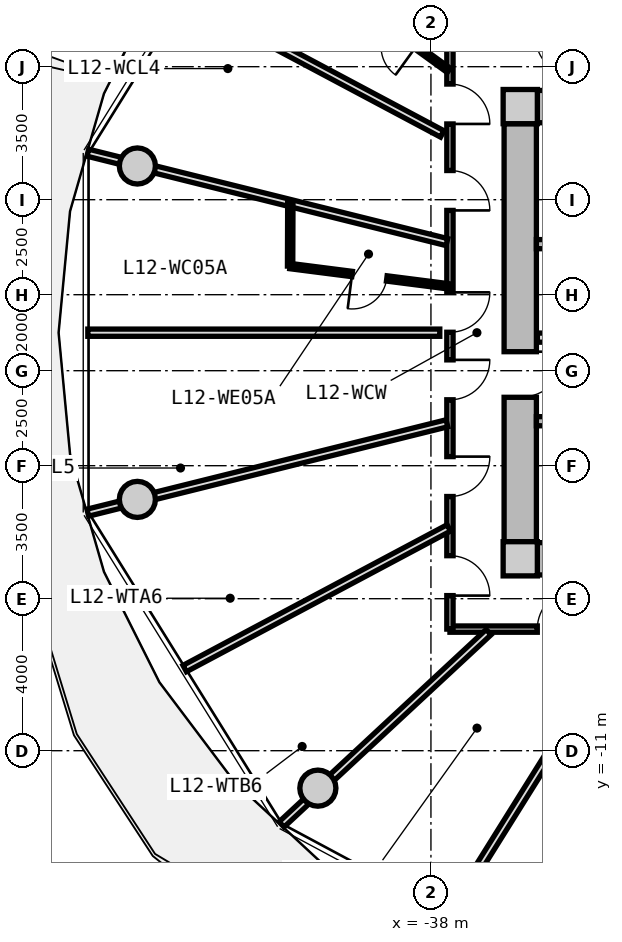
"""IFC4 building model, lengths in metres.
Left out: names, types, materials, properties, quantities, classifications, styles, units other than length and angle.
Written with IfcOpenShell. Run it as: python <this file> out.ifc"""

import sys

from ifc_helpers import new_model, si_unit, direction, frame, frame_2d, origin, origin_2d, place, context, subcontext, project, spatial, rectangle, circle, extrude, source, transform, mapped, element, fill, save


model = new_model("IFC4")
c1 = context("Model", 3, precision=1e-05, world=origin(), true_north=direction((0.0, 1.0)))
c2 = subcontext(c1, "Body", "Model", "MODEL_VIEW")
j1 = project(units=[si_unit("LENGTHUNIT", "METRE"), si_unit("PLANEANGLEUNIT", "RADIAN")], contexts=[c1])
p1 = place(None, origin())
s1 = spatial("IfcSite", under=j1, at=p1, CompositionType="ELEMENT")
p2 = place(p1, origin())
s2 = spatial("IfcBuilding", under=s1, at=p2, CompositionType="ELEMENT")
p3 = place(p2, frame((0.0, 0.0, 42.95)))
s3 = spatial("IfcBuildingStorey", under=s2, at=p3, CompositionType="ELEMENT", Elevation=42.95)
m1 = source(origin(), c2, "Body", "SweptSolid", [
    extrude(rectangle(XDim=0.9, YDim=0.9, at=origin_2d()), origin(), (0.0, 0.0, 1.0), 3.05),
])
for number, where, z_axis, x_axis in (
    (1, (-35.65, -5.95, 0.0), (0.0, 0.0, 1.0), (1.0, 0.0, 0.0)),
    (2, (-35.65, 5.95, 0.0), (0.0, 0.0, 1.0), (1.0, 0.0, 0.0)),
):
    element("IfcColumn", number, at=place(p3, frame(where, z_axis=z_axis, x_axis=x_axis)), inside=s3, PredefinedType="COLUMN", context=c2, shape_type="MappedRepresentation", body=[
        mapped(m1, transform((0.0, 0.0, 0.0), x_axis=(1.0, 0.0, 0.0), y_axis=(0.0, 1.0, 0.0), z_axis=(0.0, 0.0, 1.0), scale=1.0)),
    ])
m2 = source(origin(), c2, "Body", "SweptSolid", [
    extrude(rectangle(XDim=14.4, YDim=0.85, at=frame_2d((7.2, 0.0))), origin(), (0.0, 0.0, 1.0), 2.79),
])
for number, where, z_axis, x_axis in (
    (3, (-35.2, 5.95, 0.0), (0.0, 0.0, 1.0), (1.0, 0.0, 0.0)),
    (4, (-20.8, -5.95, 0.0), (0.0, 0.0, 1.0), (-1.0, 0.0, 0.0)),
):
    element("IfcWall", number, at=place(p3, frame(where, z_axis=z_axis, x_axis=x_axis)), inside=s3, PredefinedType="SHEAR", context=c2, shape_type="MappedRepresentation", body=[
        mapped(m2, transform((0.0, 0.0, 0.0), x_axis=(1.0, 0.0, 0.0), y_axis=(0.0, 1.0, 0.0), z_axis=(0.0, 0.0, 1.0), scale=1.0)),
    ])
m3 = source(origin(), c2, "Body", "SweptSolid", [
    extrude(rectangle(XDim=11.0, YDim=0.85, at=frame_2d((5.5, 0.0))), origin(), (0.0, 0.0, 1.0), 2.79),
])
p4 = place(p3, frame((-35.65, -5.5, 0.0), z_axis=(0.0, 0.0, 1.0), x_axis=(0.0, 1.0, 0.0)))
e5 = element("IfcWall", 5, at=p4, inside=s3, PredefinedType="SHEAR", context=c2, shape_type="MappedRepresentation", body=[
    mapped(m3, transform((0.0, 0.0, 0.0), x_axis=(1.0, 0.0, 0.0), y_axis=(0.0, 1.0, 0.0), z_axis=(0.0, 0.0, 1.0), scale=1.0)),
])
p5 = place(p4, frame((3.8, 0.0, 0.0)))
e6 = element("IfcOpeningElement", 6, at=p5, cuts=e5, PredefinedType="OPENING", context=c2, shape_type="SweptSolid", body=[
    extrude(rectangle(XDim=1.2, YDim=2.15, at=frame_2d((0.6, 1.075))), frame((0.0, 0.435, 0.0), z_axis=(0.0, -1.0, 0.0), x_axis=(1.0, 0.0, 0.0)), (0.0, 0.0, 1.0), 0.87),
])
m4 = source(origin(), c2, "Body", "SweptSolid", [
    extrude(circle(Radius=0.475, at=origin_2d()), origin(), (0.0, 0.0, 1.0), 3.05),
])
for number, where, z_axis, x_axis in (
    (7, (-45.725, 4.387, 0.0), (0.0, 0.0, 1.0), (1.0, 0.0, 0.0)),
    (8, (-45.725, -4.387, 0.0), (0.0, 0.0, 1.0), (1.0, 0.0, 0.0)),
    (9, (-40.975, -11.985, 0.0), (0.0, 0.0, 1.0), (1.0, 0.0, 0.0)),
):
    element("IfcColumn", number, at=place(p3, frame(where, z_axis=z_axis, x_axis=x_axis)), inside=s3, PredefinedType="COLUMN", context=c2, shape_type="MappedRepresentation", body=[
        mapped(m4, transform((0.0, 0.0, 0.0), x_axis=(1.0, 0.0, 0.0), y_axis=(0.0, 1.0, 0.0), z_axis=(0.0, 0.0, 1.0), scale=1.0)),
    ])
m5 = source(origin(), c2, "Body", "SweptSolid", [
    extrude(rectangle(XDim=7.765, YDim=0.24, at=frame_2d((3.883, 0.0))), origin(), (0.0, 0.0, 1.0), 2.79),
])
p6 = place(p3, frame((-35.225, 2.33, 0.0), z_axis=(0.0, 0.0, 1.0), x_axis=(1.0, 0.0, 0.0)))
e10 = element("IfcWall", 10, at=p6, inside=s3, PredefinedType="PARTITIONING", context=c2, shape_type="MappedRepresentation", body=[
    mapped(m5, transform((0.0, 0.0, 0.0), x_axis=(1.0, 0.0, 0.0), y_axis=(0.0, 1.0, 0.0), z_axis=(0.0, 0.0, 1.0), scale=1.0)),
])
p7 = place(p3, frame((-35.225, -2.33, 0.0), z_axis=(0.0, 0.0, 1.0), x_axis=(1.0, 0.0, 0.0)))
e11 = element("IfcWall", 11, at=p7, inside=s3, PredefinedType="PARTITIONING", context=c2, shape_type="MappedRepresentation", body=[
    mapped(m5, transform((0.0, 0.0, 0.0), x_axis=(1.0, 0.0, 0.0), y_axis=(0.0, 1.0, 0.0), z_axis=(0.0, 0.0, 1.0), scale=1.0)),
])
p8 = place(p7, frame((0.885, 0.0, 0.0)))
e12 = element("IfcOpeningElement", 12, at=p8, cuts=e11, PredefinedType="OPENING", context=c2, shape_type="SweptSolid", body=[
    extrude(rectangle(XDim=1.1, YDim=2.15, at=frame_2d((0.55, 1.075))), frame((0.0, 0.13, 0.0), z_axis=(0.0, -1.0, 0.0), x_axis=(1.0, 0.0, 0.0)), (0.0, 0.0, 1.0), 0.26),
])
m6 = source(origin(), c2, "Body", "SweptSolid", [
    extrude(rectangle(XDim=7.62, YDim=0.24, at=frame_2d((3.81, 0.0))), origin(), (0.0, 0.0, 1.0), 2.775),
])
p9 = place(p3, frame((-35.2, -0.13, 0.0), z_axis=(0.0, 0.0, 1.0), x_axis=(1.0, 0.0, 0.0)))
e13 = element("IfcWall", 13, at=p9, inside=s3, PredefinedType="PARTITIONING", context=c2, shape_type="MappedRepresentation", body=[
    mapped(m6, transform((0.0, 0.0, 0.0), x_axis=(1.0, 0.0, 0.0), y_axis=(0.0, 1.0, 0.0), z_axis=(0.0, 0.0, 1.0), scale=1.0)),
])
p10 = place(p9, frame((6.22, 0.0, 0.0)))
e14 = element("IfcOpeningElement", 14, at=p10, cuts=e13, PredefinedType="OPENING", context=c2, shape_type="SweptSolid", body=[
    extrude(rectangle(XDim=1.0, YDim=2.1, at=frame_2d((0.5, 1.05))), frame((0.0, 0.13, 0.0), z_axis=(0.0, -1.0, 0.0), x_axis=(1.0, 0.0, 0.0)), (0.0, 0.0, 1.0), 0.26),
])
p11 = place(p9, frame((0.85, 0.0, 0.0)))
e15 = element("IfcOpeningElement", 15, at=p11, cuts=e13, PredefinedType="OPENING", context=c2, shape_type="SweptSolid", body=[
    extrude(rectangle(XDim=1.1, YDim=2.2, at=frame_2d((0.55, 1.1))), frame((0.0, 0.13, 0.0), z_axis=(0.0, -1.0, 0.0), x_axis=(1.0, 0.0, 0.0)), (0.0, 0.0, 1.0), 0.26),
])
p12 = place(p9, frame((3.85, 0.0, 0.0)))
e16 = element("IfcOpeningElement", 16, at=p12, cuts=e13, PredefinedType="OPENING", context=c2, shape_type="SweptSolid", body=[
    extrude(rectangle(XDim=1.1, YDim=2.2, at=frame_2d((0.55, 1.1))), frame((0.0, 0.13, 0.0), z_axis=(0.0, -1.0, 0.0), x_axis=(1.0, 0.0, 0.0)), (0.0, 0.0, 1.0), 0.26),
])
m7 = source(origin(), c2, "Body", "SweptSolid", [
    extrude(rectangle(XDim=19.0, YDim=0.165, at=frame_2d((9.5, 0.0))), origin(), (0.0, 0.0, 1.0), 2.775),
])
p13 = place(p3, frame((-18.5, -7.8, 0.0), z_axis=(0.0, 0.0, 1.0), x_axis=(-1.0, 0.0, 0.0)))
e17 = element("IfcWall", 17, at=p13, inside=s3, PredefinedType="PARTITIONING", context=c2, shape_type="MappedRepresentation", body=[
    mapped(m7, transform((0.0, 0.0, 0.0), x_axis=(1.0, 0.0, 0.0), y_axis=(0.0, 1.0, 0.0), z_axis=(0.0, 0.0, 1.0), scale=1.0)),
])
p14 = place(p13, frame((15.652, 0.0, 0.0)))
e18 = element("IfcOpeningElement", 18, at=p14, cuts=e17, PredefinedType="OPENING", context=c2, shape_type="SweptSolid", body=[
    extrude(rectangle(XDim=1.05, YDim=2.15, at=frame_2d((0.525, 1.075))), frame((0.0, 0.093, 0.0), z_axis=(0.0, -1.0, 0.0), x_axis=(1.0, 0.0, 0.0)), (0.0, 0.0, 1.0), 0.185),
])
p15 = place(p13, frame((12.5, 0.0, 0.0)))
e19 = element("IfcOpeningElement", 19, at=p15, cuts=e17, PredefinedType="OPENING", context=c2, shape_type="SweptSolid", body=[
    extrude(rectangle(XDim=1.05, YDim=2.15, at=frame_2d((0.525, 1.075))), frame((0.0, 0.093, 0.0), z_axis=(0.0, -1.0, 0.0), x_axis=(1.0, 0.0, 0.0)), (0.0, 0.0, 1.0), 0.185),
])
p16 = place(p13, frame((10.104, 0.0, 0.0)))
e20 = element("IfcOpeningElement", 20, at=p16, cuts=e17, PredefinedType="OPENING", context=c2, shape_type="SweptSolid", body=[
    extrude(rectangle(XDim=1.05, YDim=2.15, at=frame_2d((0.525, 1.075))), frame((0.0, 0.093, 0.0), z_axis=(0.0, -1.0, 0.0), x_axis=(1.0, 0.0, 0.0)), (0.0, 0.0, 1.0), 0.185),
])
p17 = place(p13, frame((7.806, 0.0, 0.0)))
e21 = element("IfcOpeningElement", 21, at=p17, cuts=e17, PredefinedType="OPENING", context=c2, shape_type="SweptSolid", body=[
    extrude(rectangle(XDim=1.05, YDim=2.15, at=frame_2d((0.525, 1.075))), frame((0.0, 0.093, 0.0), z_axis=(0.0, -1.0, 0.0), x_axis=(1.0, 0.0, 0.0)), (0.0, 0.0, 1.0), 0.185),
])
p18 = place(p13, frame((5.915, 0.0, 0.0)))
e22 = element("IfcOpeningElement", 22, at=p18, cuts=e17, PredefinedType="OPENING", context=c2, shape_type="SweptSolid", body=[
    extrude(rectangle(XDim=0.92, YDim=2.1, at=frame_2d((0.46, 1.05))), frame((0.0, 0.093, 0.0), z_axis=(0.0, -1.0, 0.0), x_axis=(1.0, 0.0, 0.0)), (0.0, 0.0, 1.0), 0.185),
])
p19 = place(p13, frame((2.769, 0.0, 0.0)))
e23 = element("IfcOpeningElement", 23, at=p19, cuts=e17, PredefinedType="OPENING", context=c2, shape_type="SweptSolid", body=[
    extrude(rectangle(XDim=0.92, YDim=2.1, at=frame_2d((0.46, 1.05))), frame((0.0, 0.093, 0.0), z_axis=(0.0, -1.0, 0.0), x_axis=(1.0, 0.0, 0.0)), (0.0, 0.0, 1.0), 0.185),
])
m8 = source(origin(), c2, "Body", "SweptSolid", [
    extrude(rectangle(XDim=15.6, YDim=0.165, at=frame_2d((7.8, 0.0))), origin(), (0.0, 0.0, 1.0), 2.775),
])
p20 = place(p3, frame((-37.5, -7.8, 0.0), z_axis=(0.0, 0.0, 1.0), x_axis=(0.0, 1.0, 0.0)))
e24 = element("IfcWall", 24, at=p20, inside=s3, PredefinedType="PARTITIONING", context=c2, shape_type="MappedRepresentation", body=[
    mapped(m8, transform((0.0, 0.0, 0.0), x_axis=(1.0, 0.0, 0.0), y_axis=(0.0, 1.0, 0.0), z_axis=(0.0, 0.0, 1.0), scale=1.0)),
])
p21 = place(p20, frame((13.293, 0.0, 0.0)))
e25 = element("IfcOpeningElement", 25, at=p21, cuts=e24, PredefinedType="OPENING", context=c2, shape_type="SweptSolid", body=[
    extrude(rectangle(XDim=1.05, YDim=2.15, at=frame_2d((0.525, 1.075))), frame((0.0, 0.093, 0.0), z_axis=(0.0, -1.0, 0.0), x_axis=(1.0, 0.0, 0.0)), (0.0, 0.0, 1.0), 0.185),
])
p22 = place(p20, frame((11.018, 0.0, 0.0)))
e26 = element("IfcOpeningElement", 26, at=p22, cuts=e24, PredefinedType="OPENING", context=c2, shape_type="SweptSolid", body=[
    extrude(rectangle(XDim=1.05, YDim=2.15, at=frame_2d((0.525, 1.075))), frame((0.0, 0.093, 0.0), z_axis=(0.0, -1.0, 0.0), x_axis=(1.0, 0.0, 0.0)), (0.0, 0.0, 1.0), 0.185),
])
p23 = place(p20, frame((7.812, 0.0, 0.0)))
e27 = element("IfcOpeningElement", 27, at=p23, cuts=e24, PredefinedType="OPENING", context=c2, shape_type="SweptSolid", body=[
    extrude(rectangle(XDim=1.05, YDim=2.15, at=frame_2d((0.525, 1.075))), frame((0.0, 0.093, 0.0), z_axis=(0.0, -1.0, 0.0), x_axis=(1.0, 0.0, 0.0)), (0.0, 0.0, 1.0), 0.185),
])
p24 = place(p20, frame((6.035, 0.0, 0.0)))
e28 = element("IfcOpeningElement", 28, at=p24, cuts=e24, PredefinedType="OPENING", context=c2, shape_type="SweptSolid", body=[
    extrude(rectangle(XDim=1.05, YDim=2.15, at=frame_2d((0.525, 1.075))), frame((0.0, 0.093, 0.0), z_axis=(0.0, -1.0, 0.0), x_axis=(1.0, 0.0, 0.0)), (0.0, 0.0, 1.0), 0.185),
])
p25 = place(p20, frame((3.489, 0.0, 0.0)))
e29 = element("IfcOpeningElement", 29, at=p25, cuts=e24, PredefinedType="OPENING", context=c2, shape_type="SweptSolid", body=[
    extrude(rectangle(XDim=1.05, YDim=2.15, at=frame_2d((0.525, 1.075))), frame((0.0, 0.093, 0.0), z_axis=(0.0, -1.0, 0.0), x_axis=(1.0, 0.0, 0.0)), (0.0, 0.0, 1.0), 0.185),
])
p26 = place(p20, frame((0.882, 0.0, 0.0)))
e30 = element("IfcOpeningElement", 30, at=p26, cuts=e24, PredefinedType="OPENING", context=c2, shape_type="SweptSolid", body=[
    extrude(rectangle(XDim=1.05, YDim=2.15, at=frame_2d((0.525, 1.075))), frame((0.0, 0.093, 0.0), z_axis=(0.0, -1.0, 0.0), x_axis=(1.0, 0.0, 0.0)), (0.0, 0.0, 1.0), 0.185),
])
m9 = source(origin(), c2, "Body", "SweptSolid", [
    extrude(rectangle(XDim=9.737, YDim=0.19, at=frame_2d((4.869, 0.0))), origin(), (0.0, 0.0, 1.0), 2.225),
])
p27 = place(p3, frame((-37.58, 2.385, 0.0), z_axis=(0.0, 0.0, 1.0), x_axis=(-0.970392716238, 0.241532557375, 0.0)))
e31 = element("IfcWall", 31, at=p27, inside=s3, PredefinedType="PARTITIONING", context=c2, shape_type="MappedRepresentation", body=[
    mapped(m9, transform((0.0, 0.0, 0.0), x_axis=(1.0, 0.0, 0.0), y_axis=(0.0, 1.0, 0.0), z_axis=(0.0, 0.0, 1.0), scale=1.0)),
])
m10 = source(origin(), c2, "Body", "SweptSolid", [
    extrude(rectangle(XDim=7.677, YDim=0.19, at=frame_2d((3.838, 0.0))), origin(), (0.0, 0.0, 1.0), 2.775),
])
p28 = place(p3, frame((-37.703, 5.231, 0.0), z_axis=(0.0, 0.0, 1.0), x_axis=(-0.882725057546, 0.469889851753, 0.0)))
e32 = element("IfcWall", 32, at=p28, inside=s3, PredefinedType="PARTITIONING", context=c2, shape_type="MappedRepresentation", body=[
    mapped(m10, transform((0.0, 0.0, 0.0), x_axis=(1.0, 0.0, 0.0), y_axis=(0.0, 1.0, 0.0), z_axis=(0.0, 0.0, 1.0), scale=1.0)),
])
m11 = source(origin(), c2, "Body", "SweptSolid", [
    extrude(rectangle(XDim=3.051, YDim=0.14, at=frame_2d((1.525, 0.0))), origin(), (0.0, 0.0, 1.0), 2.775),
])
p29 = place(p3, frame((-37.53, 6.903, 0.0), z_axis=(0.0, 0.0, 1.0), x_axis=(-0.809849031404, 0.586638343729, 0.0)))
e33 = element("IfcWall", 33, at=p29, inside=s3, PredefinedType="PARTITIONING", context=c2, shape_type="MappedRepresentation", body=[
    mapped(m11, transform((0.0, 0.0, 0.0), x_axis=(1.0, 0.0, 0.0), y_axis=(0.0, 1.0, 0.0), z_axis=(0.0, 0.0, 1.0), scale=1.0)),
])
p30 = place(p29, frame((1.065, 0.0, 0.0)))
e34 = element("IfcOpeningElement", 34, at=p30, cuts=e33, PredefinedType="OPENING", context=c2, shape_type="SweptSolid", body=[
    extrude(rectangle(XDim=0.92, YDim=2.1, at=frame_2d((0.46, 1.05))), frame((0.0, 0.08, 0.0), z_axis=(0.0, -1.0, 0.0), x_axis=(1.0, 0.0, 0.0)), (0.0, 0.0, 1.0), 0.16),
])
p31 = place(p3, frame((-37.58, -2.385, 0.0), z_axis=(0.0, 0.0, 1.0), x_axis=(-0.970392716238, -0.241532557375, 0.0)))
e35 = element("IfcWall", 35, at=p31, inside=s3, PredefinedType="PARTITIONING", context=c2, shape_type="MappedRepresentation", body=[
    mapped(m9, transform((0.0, 0.0, 0.0), x_axis=(1.0, 0.0, 0.0), y_axis=(0.0, 1.0, 0.0), z_axis=(0.0, 0.0, 1.0), scale=1.0)),
])
m12 = source(origin(), c2, "Body", "SweptSolid", [
    extrude(rectangle(XDim=9.261, YDim=0.19, at=frame_2d((4.631, 0.0))), origin(), (0.0, 0.0, 1.0), 2.775),
])
p32 = place(p3, frame((-37.767, 0.0, 0.0), z_axis=(0.0, 0.0, 1.0), x_axis=(-1.0, 0.0, 0.0)))
e36 = element("IfcWall", 36, at=p32, inside=s3, PredefinedType="PARTITIONING", context=c2, shape_type="MappedRepresentation", body=[
    mapped(m12, transform((0.0, 0.0, 0.0), x_axis=(1.0, 0.0, 0.0), y_axis=(0.0, 1.0, 0.0), z_axis=(0.0, 0.0, 1.0), scale=1.0)),
])
m13 = source(origin(), c2, "Body", "SweptSolid", [
    extrude(rectangle(XDim=4.21, YDim=0.14, at=frame_2d((2.105, 0.0))), origin(), (0.0, 0.0, 1.0), 2.775),
])
p33 = place(p3, frame((-37.53, 1.219, 0.0), z_axis=(0.0, 0.0, 1.0), x_axis=(-0.991917821325, 0.126881975625, 0.0)))
e37 = element("IfcWall", 37, at=p33, inside=s3, PredefinedType="PARTITIONING", context=c2, shape_type="MappedRepresentation", body=[
    mapped(m13, transform((0.0, 0.0, 0.0), x_axis=(1.0, 0.0, 0.0), y_axis=(0.0, 1.0, 0.0), z_axis=(0.0, 0.0, 1.0), scale=1.0)),
])
p34 = place(p33, frame((1.645, 0.0, 0.0)))
e38 = element("IfcOpeningElement", 38, at=p34, cuts=e37, PredefinedType="OPENING", context=c2, shape_type="SweptSolid", body=[
    extrude(rectangle(XDim=0.92, YDim=2.1, at=frame_2d((0.46, 1.05))), frame((0.0, 0.08, 0.0), z_axis=(0.0, -1.0, 0.0), x_axis=(1.0, 0.0, 0.0)), (0.0, 0.0, 1.0), 0.16),
])
m14 = source(origin(), c2, "Body", "SweptSolid", [
    extrude(rectangle(XDim=1.675, YDim=0.14, at=frame_2d((0.837, 0.0))), origin(), (0.0, 0.0, 1.0), 2.775),
])
p35 = place(p3, frame((-41.706, 1.753, 0.0), z_axis=(0.0, 0.0, 1.0), x_axis=(0.003644821977, 0.999993357614, 0.0)))
e39 = element("IfcWall", 39, at=p35, inside=s3, PredefinedType="PARTITIONING", context=c2, shape_type="MappedRepresentation", body=[
    mapped(m14, transform((0.0, 0.0, 0.0), x_axis=(1.0, 0.0, 0.0), y_axis=(0.0, 1.0, 0.0), z_axis=(0.0, 0.0, 1.0), scale=1.0)),
])
m15 = source(origin(), c2, "Body", "SweptSolid", [
    extrude(rectangle(XDim=7.435, YDim=0.19, at=frame_2d((3.717, 0.0))), origin(), (0.0, 0.0, 1.0), 2.415),
])
p36 = place(p3, frame((-36.483, -7.88, 0.0), z_axis=(0.0, 0.0, 1.0), x_axis=(-0.732651956848, -0.680603489652, 0.0)))
e40 = element("IfcWall", 40, at=p36, inside=s3, PredefinedType="PARTITIONING", context=c2, shape_type="MappedRepresentation", body=[
    mapped(m15, transform((0.0, 0.0, 0.0), x_axis=(1.0, 0.0, 0.0), y_axis=(0.0, 1.0, 0.0), z_axis=(0.0, 0.0, 1.0), scale=1.0)),
])
m16 = source(origin(), c2, "Body", "SweptSolid", [
    extrude(rectangle(XDim=7.873, YDim=0.19, at=frame_2d((3.937, 0.0))), origin(), (0.0, 0.0, 1.0), 2.775),
])
p37 = place(p3, frame((-37.53, -5.138, 0.0), z_axis=(0.0, 0.0, 1.0), x_axis=(-0.882666052726, -0.470000680175, 0.0)))
e41 = element("IfcWall", 41, at=p37, inside=s3, PredefinedType="PARTITIONING", context=c2, shape_type="MappedRepresentation", body=[
    mapped(m16, transform((0.0, 0.0, 0.0), x_axis=(1.0, 0.0, 0.0), y_axis=(0.0, 1.0, 0.0), z_axis=(0.0, 0.0, 1.0), scale=1.0)),
])
m17 = source(origin(), c2, "Body", "SweptSolid", [
    extrude(rectangle(XDim=8.818, YDim=0.19, at=frame_2d((4.409, 0.0))), origin(), (0.0, 0.0, 1.0), 2.775),
])
p38 = place(p3, frame((-32.841, -7.83, 0.0), z_axis=(0.0, 0.0, 1.0), x_axis=(-0.529931746109, -0.848040296487, 0.0)))
e42 = element("IfcWall", 42, at=p38, inside=s3, PredefinedType="PARTITIONING", context=c2, shape_type="MappedRepresentation", body=[
    mapped(m17, transform((0.0, 0.0, 0.0), x_axis=(1.0, 0.0, 0.0), y_axis=(0.0, 1.0, 0.0), z_axis=(0.0, 0.0, 1.0), scale=1.0)),
])
m18 = source(origin(), c2, "Body", "SweptSolid", [
    extrude(rectangle(XDim=1.2, YDim=2.15, at=frame_2d((0.6, 1.075))), frame((0.0, 0.025, 0.0), z_axis=(0.0, -1.0, 0.0), x_axis=(1.0, 0.0, 0.0)), (0.0, 0.0, 1.0), 0.05),
])
p39 = place(p5, frame((1.2, 0.0, 0.0), z_axis=(0.0, 0.0, 1.0), x_axis=(-1.0, 0.0, 0.0)))
e43 = element("IfcDoor", 43, at=p39, inside=s3, OperationType="SINGLE_SWING_LEFT", PredefinedType="DOOR", context=c2, shape_type="MappedRepresentation", body=[
    mapped(m18, transform((0.0, 0.0, 0.0), x_axis=(1.0, 0.0, 0.0), y_axis=(0.0, 1.0, 0.0), z_axis=(0.0, 0.0, 1.0), scale=1.0)),
])
fill(e6, e43)
m19 = source(origin(), c2, "Body", "SweptSolid", [
    extrude(rectangle(XDim=1.05, YDim=2.15, at=frame_2d((0.525, 1.075))), frame((0.0, 0.025, 0.0), z_axis=(0.0, -1.0, 0.0), x_axis=(1.0, 0.0, 0.0)), (0.0, 0.0, 1.0), 0.05),
])
p40 = place(p21, frame((1.05, 0.0, 0.0), z_axis=(0.0, 0.0, 1.0), x_axis=(-1.0, 0.0, 0.0)))
e44 = element("IfcDoor", 44, at=p40, inside=s3, OperationType="SINGLE_SWING_RIGHT", PredefinedType="DOOR", context=c2, shape_type="MappedRepresentation", body=[
    mapped(m19, transform((0.0, 0.0, 0.0), x_axis=(1.0, 0.0, 0.0), y_axis=(0.0, 1.0, 0.0), z_axis=(0.0, 0.0, 1.0), scale=1.0)),
])
fill(e25, e44)
p41 = place(p22, frame((1.05, 0.0, 0.0), z_axis=(0.0, 0.0, 1.0), x_axis=(-1.0, 0.0, 0.0)))
e45 = element("IfcDoor", 45, at=p41, inside=s3, OperationType="SINGLE_SWING_RIGHT", PredefinedType="DOOR", context=c2, shape_type="MappedRepresentation", body=[
    mapped(m19, transform((0.0, 0.0, 0.0), x_axis=(1.0, 0.0, 0.0), y_axis=(0.0, 1.0, 0.0), z_axis=(0.0, 0.0, 1.0), scale=1.0)),
])
fill(e26, e45)
p42 = place(p23, frame((1.05, 0.0, 0.0), z_axis=(0.0, 0.0, 1.0), x_axis=(-1.0, 0.0, 0.0)))
e46 = element("IfcDoor", 46, at=p42, inside=s3, OperationType="SINGLE_SWING_LEFT", PredefinedType="DOOR", context=c2, shape_type="MappedRepresentation", body=[
    mapped(m19, transform((0.0, 0.0, 0.0), x_axis=(1.0, 0.0, 0.0), y_axis=(0.0, 1.0, 0.0), z_axis=(0.0, 0.0, 1.0), scale=1.0)),
])
fill(e27, e46)
m20 = source(origin(), c2, "Body", "SweptSolid", [
    extrude(rectangle(XDim=0.92, YDim=2.1, at=frame_2d((0.46, 1.05))), frame((0.0, 0.025, 0.0), z_axis=(0.0, -1.0, 0.0), x_axis=(1.0, 0.0, 0.0)), (0.0, 0.0, 1.0), 0.05),
])
p43 = place(p34, origin())
e47 = element("IfcDoor", 47, at=p43, inside=s3, OperationType="SINGLE_SWING_RIGHT", PredefinedType="DOOR", context=c2, shape_type="MappedRepresentation", body=[
    mapped(m20, transform((0.0, 0.0, 0.0), x_axis=(1.0, 0.0, 0.0), y_axis=(0.0, 1.0, 0.0), z_axis=(0.0, 0.0, 1.0), scale=1.0)),
])
fill(e38, e47)
p44 = place(p24, frame((1.05, 0.0, 0.0), z_axis=(0.0, 0.0, 1.0), x_axis=(-1.0, 0.0, 0.0)))
e48 = element("IfcDoor", 48, at=p44, inside=s3, OperationType="SINGLE_SWING_LEFT", PredefinedType="DOOR", context=c2, shape_type="MappedRepresentation", body=[
    mapped(m19, transform((0.0, 0.0, 0.0), x_axis=(1.0, 0.0, 0.0), y_axis=(0.0, 1.0, 0.0), z_axis=(0.0, 0.0, 1.0), scale=1.0)),
])
fill(e28, e48)
p45 = place(p25, frame((1.05, 0.0, 0.0), z_axis=(0.0, 0.0, 1.0), x_axis=(-1.0, 0.0, 0.0)))
e49 = element("IfcDoor", 49, at=p45, inside=s3, OperationType="SINGLE_SWING_LEFT", PredefinedType="DOOR", context=c2, shape_type="MappedRepresentation", body=[
    mapped(m19, transform((0.0, 0.0, 0.0), x_axis=(1.0, 0.0, 0.0), y_axis=(0.0, 1.0, 0.0), z_axis=(0.0, 0.0, 1.0), scale=1.0)),
])
fill(e29, e49)
p46 = place(p26, frame((1.05, 0.0, 0.0), z_axis=(0.0, 0.0, 1.0), x_axis=(-1.0, 0.0, 0.0)))
e50 = element("IfcDoor", 50, at=p46, inside=s3, OperationType="SINGLE_SWING_RIGHT", PredefinedType="DOOR", context=c2, shape_type="MappedRepresentation", body=[
    mapped(m19, transform((0.0, 0.0, 0.0), x_axis=(1.0, 0.0, 0.0), y_axis=(0.0, 1.0, 0.0), z_axis=(0.0, 0.0, 1.0), scale=1.0)),
])
fill(e30, e50)
p47 = place(p14, frame((1.05, 0.0, 0.0), z_axis=(0.0, 0.0, 1.0), x_axis=(-1.0, 0.0, 0.0)))
e51 = element("IfcDoor", 51, at=p47, inside=s3, OperationType="SINGLE_SWING_RIGHT", PredefinedType="DOOR", context=c2, shape_type="MappedRepresentation", body=[
    mapped(m19, transform((0.0, 0.0, 0.0), x_axis=(1.0, 0.0, 0.0), y_axis=(0.0, 1.0, 0.0), z_axis=(0.0, 0.0, 1.0), scale=1.0)),
])
fill(e18, e51)
save(model, sys.argv[1])
